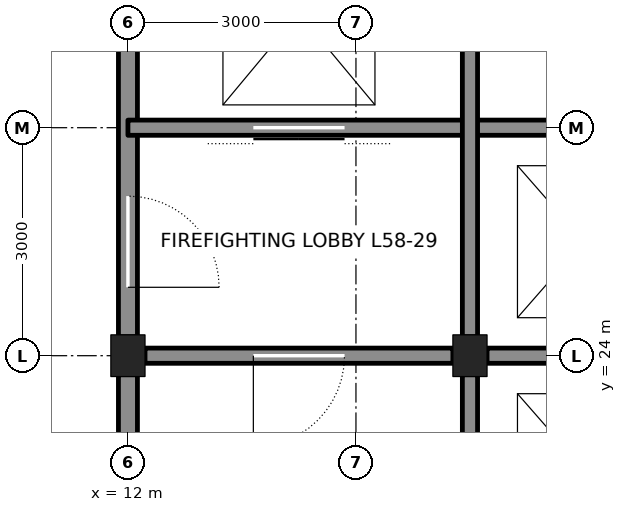
"""IFC4 building model, lengths in metres.
Left out: names, types, materials, properties, quantities, classifications, styles, units other than length and angle.
Written with IfcOpenShell. Run it as: python <this file> out.ifc"""

import sys

from ifc_helpers import new_model, si_unit, direction, frame, frame_2d, origin, origin_2d, place, context, subcontext, project, spatial, rectangle, i_section, extrude, element, fill, save


model = new_model("IFC4")
c1 = context("Model", 3, precision=1e-05, world=origin(), true_north=direction((0.0, 1.0)))
c2 = subcontext(c1, "Body", "Model", "MODEL_VIEW")
j1 = project(units=[si_unit("LENGTHUNIT", "METRE"), si_unit("PLANEANGLEUNIT", "RADIAN")], contexts=[c1])
p1 = place(None, origin())
s1 = spatial("IfcSite", under=j1, at=p1, CompositionType="ELEMENT")
p2 = place(p1, origin())
s2 = spatial("IfcBuilding", under=s1, at=p2, CompositionType="ELEMENT")
p3 = place(p2, frame((0.0, 0.0, 262.2)))
s3 = spatial("IfcBuildingStorey", under=s2, at=p3, CompositionType="ELEMENT", Elevation=262.2)
for number, where, z_axis, x_axis in (
    (1, (12.0, 24.0, 0.0), (0.0, 0.0, 1.0), (1.0, 0.0, 0.0)),
    (2, (16.5, 24.0, 0.0), (0.0, 0.0, 1.0), (1.0, 0.0, 0.0)),
):
    element("IfcColumn", number, at=place(p3, frame(where, z_axis=z_axis, x_axis=x_axis)), inside=s3, PredefinedType="COLUMN", context=c2, shape_type="SweptSolid", body=[
        extrude(i_section(OverallWidth=0.449, OverallDepth=0.549, WebThickness=0.072, FlangeThickness=0.115, at=origin_2d()), origin(), (0.0, 0.0, 1.0), 4.2),
    ])
p4 = place(p3, frame((12.0, 21.25, 0.0), z_axis=(0.0, 0.0, 1.0), x_axis=(0.0, 1.0, 0.0)))
e3 = element("IfcWall", 3, at=p4, inside=s3, PredefinedType="SOLIDWALL", context=c2, shape_type="SweptSolid", body=[
    extrude(rectangle(XDim=2.5, YDim=0.25, at=frame_2d((1.25, 0.0))), origin(), (0.0, 0.0, 1.0), 3.113),
])
p5 = place(p3, frame((12.0, 24.25, 0.0), z_axis=(0.0, 0.0, 1.0), x_axis=(0.0, 1.0, 0.0)))
e4 = element("IfcWall", 4, at=p5, inside=s3, PredefinedType="SOLIDWALL", context=c2, shape_type="SweptSolid", body=[
    extrude(rectangle(XDim=8.5, YDim=0.25, at=frame_2d((4.25, 0.0))), origin(), (0.0, 0.0, 1.0), 3.113),
])
p6 = place(p5, frame((0.65, 0.0, 0.0)))
e5 = element("IfcOpeningElement", 5, at=p6, cuts=e4, PredefinedType="OPENING", context=c2, shape_type="SweptSolid", body=[
    extrude(rectangle(XDim=1.2, YDim=2.1, at=frame_2d((0.6, 1.05))), frame((0.0, 0.135, 0.0), z_axis=(0.0, -1.0, 0.0), x_axis=(1.0, 0.0, 0.0)), (0.0, 0.0, 1.0), 0.27),
])
p7 = place(p5, frame((6.875, 0.0, 0.0)))
e6 = element("IfcOpeningElement", 6, at=p7, cuts=e4, PredefinedType="OPENING", context=c2, shape_type="SweptSolid", body=[
    extrude(rectangle(XDim=0.75, YDim=2.1, at=frame_2d((0.375, 1.05))), frame((0.0, 0.135, 0.0), z_axis=(0.0, -1.0, 0.0), x_axis=(1.0, 0.0, 0.0)), (0.0, 0.0, 1.0), 0.27),
])
p8 = place(p3, frame((12.225, 24.0, 0.0), z_axis=(0.0, 0.0, 1.0), x_axis=(1.0, 0.0, 0.0)))
e7 = element("IfcWall", 7, at=p8, inside=s3, PredefinedType="SOLIDWALL", context=c2, shape_type="SweptSolid", body=[
    extrude(rectangle(XDim=4.05, YDim=0.2, at=frame_2d((2.025, 0.0))), origin(), (0.0, 0.0, 1.0), 3.09),
])
p9 = place(p8, frame((1.425, 0.0, 0.0)))
e8 = element("IfcOpeningElement", 8, at=p9, cuts=e7, PredefinedType="OPENING", context=c2, shape_type="SweptSolid", body=[
    extrude(rectangle(XDim=1.2, YDim=2.1, at=frame_2d((0.6, 1.05))), frame((0.0, 0.11, 0.0), z_axis=(0.0, -1.0, 0.0), x_axis=(1.0, 0.0, 0.0)), (0.0, 0.0, 1.0), 0.22),
])
p10 = place(p3, frame((16.725, 24.0, 0.0), z_axis=(0.0, 0.0, 1.0), x_axis=(1.0, 0.0, 0.0)))
e9 = element("IfcWall", 9, at=p10, inside=s3, PredefinedType="SOLIDWALL", context=c2, shape_type="SweptSolid", body=[
    extrude(rectangle(XDim=2.775, YDim=0.2, at=frame_2d((1.388, 0.0))), origin(), (0.0, 0.0, 1.0), 3.09),
])
p11 = place(p3, frame((12.0, 27.0, 0.0), z_axis=(0.0, 0.0, 1.0), x_axis=(1.0, 0.0, 0.0)))
e10 = element("IfcWall", 10, at=p11, inside=s3, PredefinedType="SOLIDWALL", context=c2, shape_type="SweptSolid", body=[
    extrude(rectangle(XDim=7.5, YDim=0.2, at=frame_2d((3.75, 0.0))), origin(), (0.0, 0.0, 1.0), 4.04),
])
p12 = place(p11, frame((1.65, 0.0, 0.0)))
e11 = element("IfcOpeningElement", 11, at=p12, cuts=e10, PredefinedType="OPENING", context=c2, shape_type="SweptSolid", body=[
    extrude(rectangle(XDim=1.2, YDim=2.1, at=frame_2d((0.6, 1.05))), frame((0.0, 0.11, 0.0), z_axis=(0.0, -1.0, 0.0), x_axis=(1.0, 0.0, 0.0)), (0.0, 0.0, 1.0), 0.22),
])
p13 = place(p3, frame((16.5, 21.25, 0.0), z_axis=(0.0, 0.0, 1.0), x_axis=(0.0, 1.0, 0.0)))
e12 = element("IfcWall", 12, at=p13, inside=s3, PredefinedType="SOLIDWALL", context=c2, shape_type="SweptSolid", body=[
    extrude(rectangle(XDim=2.5, YDim=0.2, at=frame_2d((1.25, 0.0))), origin(), (0.0, 0.0, 1.0), 3.113),
])
p14 = place(p3, frame((16.5, 24.25, 0.0), z_axis=(0.0, 0.0, 1.0), x_axis=(0.0, 1.0, 0.0)))
e13 = element("IfcWall", 13, at=p14, inside=s3, PredefinedType="SOLIDWALL", context=c2, shape_type="SweptSolid", body=[
    extrude(rectangle(XDim=8.5, YDim=0.2, at=frame_2d((4.25, 0.0))), origin(), (0.0, 0.0, 1.0), 3.113),
])
p15 = place(p9, frame((1.2, 0.0, 0.0), z_axis=(0.0, 0.0, 1.0), x_axis=(-1.0, 0.0, 0.0)))
e14 = element("IfcDoor", 14, at=p15, inside=s3, OperationType="SINGLE_SWING_RIGHT", PredefinedType="DOOR", context=c2, shape_type="SweptSolid", body=[
    extrude(rectangle(XDim=1.2, YDim=2.1, at=frame_2d((0.6, 1.05))), frame((0.0, 0.025, 0.0), z_axis=(0.0, -1.0, 0.0), x_axis=(1.0, 0.0, 0.0)), (0.0, 0.0, 1.0), 0.05),
])
fill(e8, e14)
p16 = place(p6, frame((1.2, 0.0, 0.0), z_axis=(0.0, 0.0, 1.0), x_axis=(-1.0, 0.0, 0.0)))
e15 = element("IfcDoor", 15, at=p16, inside=s3, OperationType="SINGLE_SWING_RIGHT", PredefinedType="DOOR", context=c2, shape_type="SweptSolid", body=[
    extrude(rectangle(XDim=1.2, YDim=2.1, at=frame_2d((0.6, 1.05))), frame((0.0, 0.025, 0.0), z_axis=(0.0, -1.0, 0.0), x_axis=(1.0, 0.0, 0.0)), (0.0, 0.0, 1.0), 0.05),
])
fill(e5, e15)
p17 = place(p12, origin())
e16 = element("IfcDoor", 16, at=p17, inside=s3, OperationType="DOUBLE_DOOR_SLIDING", PredefinedType="DOOR", context=c2, shape_type="SweptSolid", body=[
    extrude(rectangle(XDim=1.2, YDim=2.1, at=frame_2d((0.6, 1.05))), frame((0.0, 0.025, 0.0), z_axis=(0.0, -1.0, 0.0), x_axis=(1.0, 0.0, 0.0)), (0.0, 0.0, 1.0), 0.05),
])
fill(e11, e16)
save(model, sys.argv[1])
